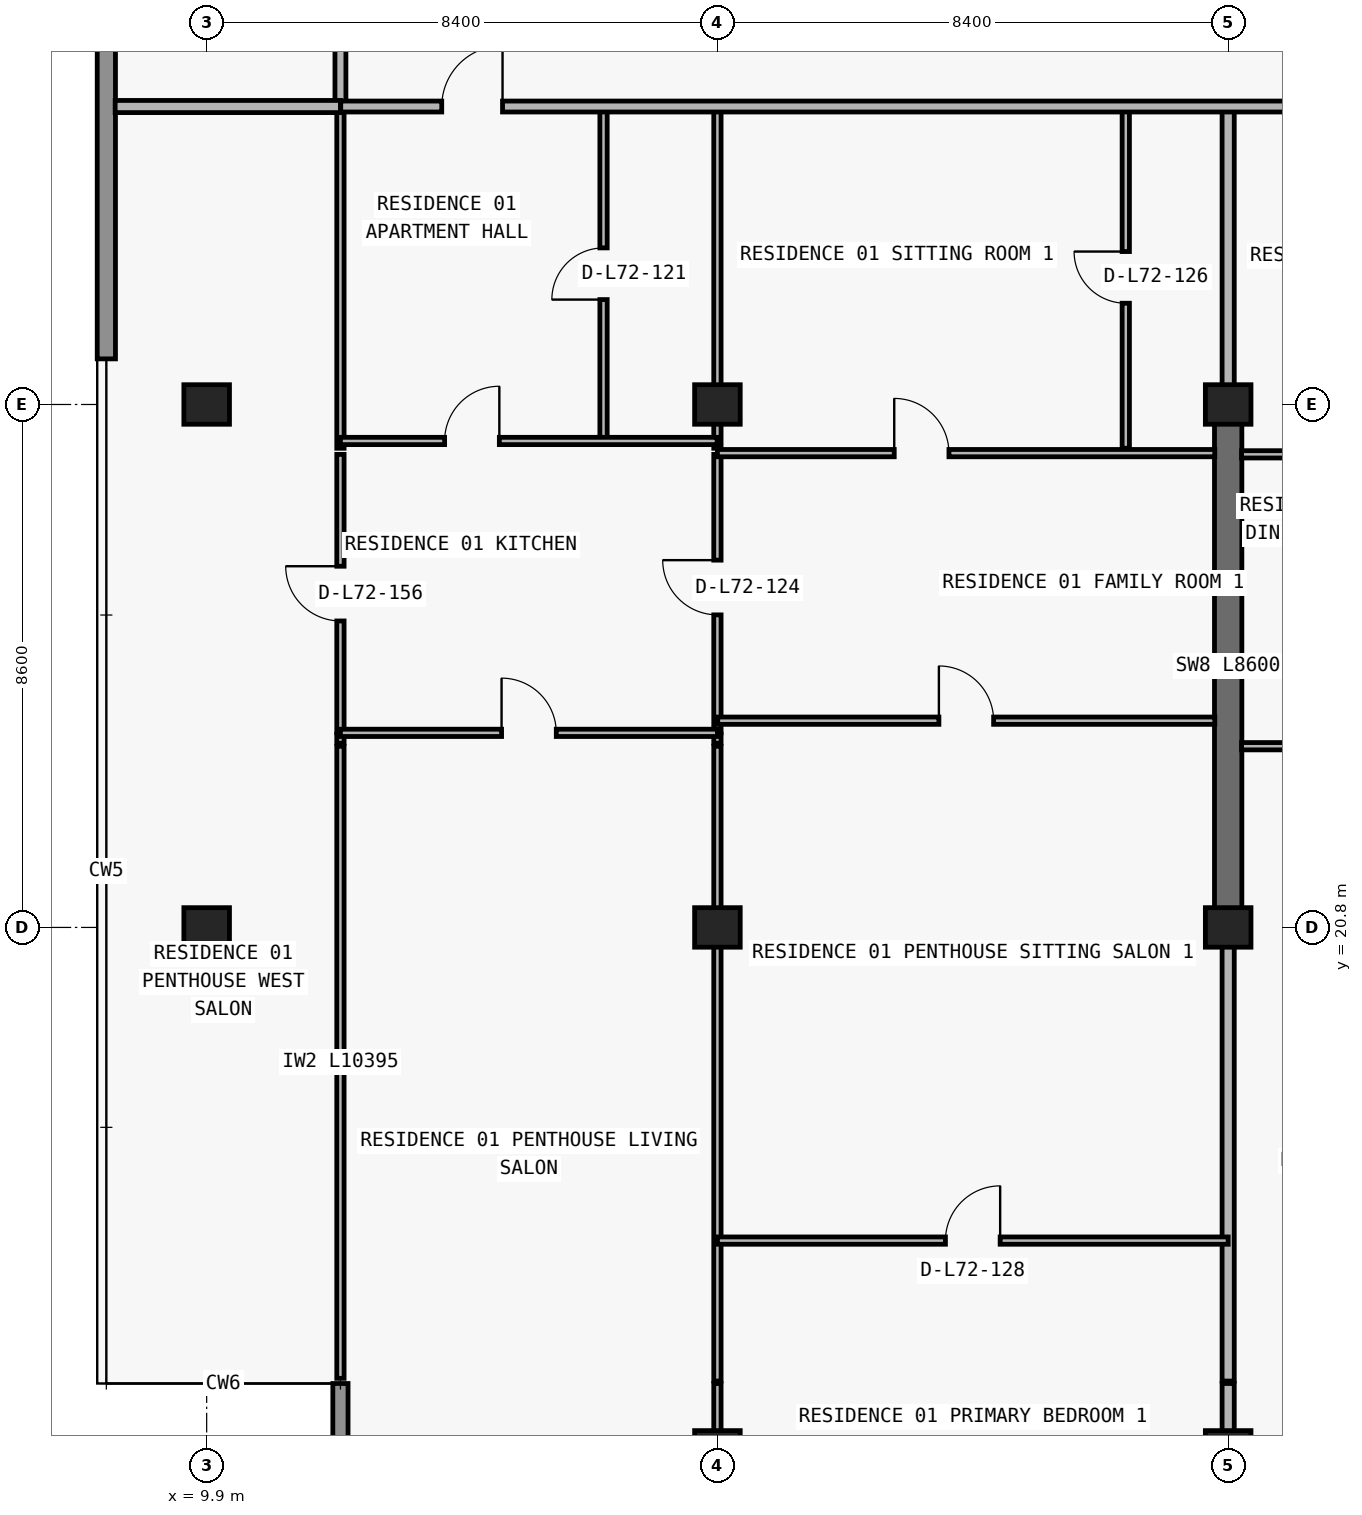
"""IFC4 building model, lengths in metres.
Left out: names, types, materials, properties, quantities, classifications, styles, units other than length and angle.
Written with IfcOpenShell. Run it as: python <this file> out.ifc"""

import sys

from ifc_helpers import new_model, si_unit, direction, frame, frame_2d, origin, origin_2d, place, context, subcontext, project, spatial, rectangle, extrude, element, fill, save


model = new_model("IFC4")
c1 = context("Model", 3, precision=1e-05, world=origin(), true_north=direction((0.0, 1.0)))
c2 = subcontext(c1, "Body", "Model", "MODEL_VIEW")
j1 = project(units=[si_unit("LENGTHUNIT", "METRE"), si_unit("PLANEANGLEUNIT", "RADIAN")], contexts=[c1])
p1 = place(None, origin())
s1 = spatial("IfcSite", under=j1, at=p1, CompositionType="ELEMENT")
p2 = place(p1, origin())
s2 = spatial("IfcBuilding", under=s1, at=p2, CompositionType="ELEMENT")
p3 = place(p2, frame((0.0, 0.0, 256.2)))
s3 = spatial("IfcBuildingStorey", under=s2, at=p3, CompositionType="ELEMENT", Elevation=256.2)
for number, where, z_axis, x_axis in (
    (1, (18.3, 12.2, 0.0), (0.0, 0.0, 1.0), (1.0, 0.0, 0.0)),
    (2, (26.7, 12.2, 0.0), (0.0, 0.0, 1.0), (1.0, 0.0, 0.0)),
    (3, (9.9, 20.8, 0.0), (0.0, 0.0, 1.0), (1.0, 0.0, 0.0)),
    (4, (18.3, 20.8, 0.0), (0.0, 0.0, 1.0), (1.0, 0.0, 0.0)),
    (5, (26.7, 20.8, 0.0), (0.0, 0.0, 1.0), (1.0, 0.0, 0.0)),
    (6, (9.9, 29.4, 0.0), (0.0, 0.0, 1.0), (1.0, 0.0, 0.0)),
    (7, (18.3, 29.4, 0.0), (0.0, 0.0, 1.0), (1.0, 0.0, 0.0)),
    (8, (26.7, 29.4, 0.0), (0.0, 0.0, 1.0), (1.0, 0.0, 0.0)),
):
    element("IfcColumn", number, at=place(p3, frame(where, z_axis=z_axis, x_axis=x_axis)), inside=s3, PredefinedType="COLUMN", context=c2, shape_type="SweptSolid", body=[
        extrude(rectangle(XDim=0.75, YDim=0.65, at=origin_2d()), origin(), (0.0, 0.0, 1.0), 3.05),
    ])
p4 = place(p3, frame((26.7, 20.8, 0.0), z_axis=(0.0, 0.0, 1.0), x_axis=(0.0, 1.0, 0.0)))
e9 = element("IfcWall", 9, at=p4, inside=s3, PredefinedType="SHEAR", context=c2, shape_type="SweptSolid", body=[
    extrude(rectangle(XDim=8.6, YDim=0.45, at=frame_2d((4.3, 0.0))), origin(), (0.0, 0.0, 1.0), 3.05),
])
p5 = place(p3, frame((12.1, 13.3, 0.0), z_axis=(0.0, 0.0, 1.0), x_axis=(0.0, -1.0, 0.0)))
e10 = element("IfcWall", 10, at=p5, inside=s3, PredefinedType="ELEMENTEDWALL", context=c2, shape_type="SweptSolid", body=[
    extrude(rectangle(XDim=3.45, YDim=0.25, at=frame_2d((1.725, 0.0))), origin(), (0.0, 0.0, 1.0), 3.05),
])
p6 = place(p3, frame((8.25, 30.15, 0.0), z_axis=(0.0, 0.0, 1.0), x_axis=(0.0, 1.0, 0.0)))
e11 = element("IfcWall", 11, at=p6, inside=s3, PredefinedType="STANDARD", context=c2, shape_type="SweptSolid", body=[
    extrude(rectangle(XDim=16.85, YDim=0.3, at=frame_2d((8.425, 0.0))), origin(), (0.0, 0.0, 1.0), 3.05),
])
p7 = place(p3, frame((12.1, 13.385, 0.0), z_axis=(0.0, 0.0, 1.0), x_axis=(0.0, 1.0, 0.0)))
e12 = element("IfcWall", 12, at=p7, inside=s3, PredefinedType="PARTITIONING", context=c2, shape_type="SweptSolid", body=[
    extrude(rectangle(XDim=10.395, YDim=0.12, at=frame_2d((5.198, 0.0))), origin(), (0.0, 0.0, 1.0), 3.05),
])
p8 = place(p3, frame((12.1, 23.83, 0.0), z_axis=(0.0, 0.0, 1.0), x_axis=(0.0, 1.0, 0.0)))
e13 = element("IfcWall", 13, at=p8, inside=s3, PredefinedType="PARTITIONING", context=c2, shape_type="SweptSolid", body=[
    extrude(rectangle(XDim=0.15, YDim=0.12, at=frame_2d((0.075, 0.0))), origin(), (0.0, 0.0, 1.0), 3.05),
])
p9 = place(p3, frame((12.1, 24.0, 0.0), z_axis=(0.0, 0.0, 1.0), x_axis=(0.0, 1.0, 0.0)))
e14 = element("IfcWall", 14, at=p9, inside=s3, PredefinedType="PARTITIONING", context=c2, shape_type="SweptSolid", body=[
    extrude(rectangle(XDim=4.58, YDim=0.12, at=frame_2d((2.29, 0.0))), origin(), (0.0, 0.0, 1.0), 3.05),
])
p10 = place(p9, frame((1.84, 0.0, 0.0)))
e15 = element("IfcOpeningElement", 15, at=p10, cuts=e14, PredefinedType="OPENING", context=c2, shape_type="SweptSolid", body=[
    extrude(rectangle(XDim=0.9, YDim=2.15, at=frame_2d((0.45, 1.075))), frame((0.0, 0.07, 0.0), z_axis=(0.0, -1.0, 0.0), x_axis=(1.0, 0.0, 0.0)), (0.0, 0.0, 1.0), 0.14),
])
p11 = place(p3, frame((12.1, 28.68, 0.0), z_axis=(0.0, 0.0, 1.0), x_axis=(0.0, 1.0, 0.0)))
e16 = element("IfcWall", 16, at=p11, inside=s3, PredefinedType="PARTITIONING", context=c2, shape_type="SweptSolid", body=[
    extrude(rectangle(XDim=5.62, YDim=0.12, at=frame_2d((2.81, 0.0))), origin(), (0.0, 0.0, 1.0), 3.05),
])
p12 = place(p3, frame((12.1, 34.305, 0.0), z_axis=(0.0, 0.0, 1.0), x_axis=(0.0, 1.0, 0.0)))
e17 = element("IfcWall", 17, at=p12, inside=s3, PredefinedType="PARTITIONING", context=c2, shape_type="SweptSolid", body=[
    extrude(rectangle(XDim=2.695, YDim=0.18, at=frame_2d((1.348, 0.0))), origin(), (0.0, 0.0, 1.0), 3.05),
])
p13 = place(p3, frame((16.427, 28.8, 0.0), z_axis=(0.0, 0.0, 1.0), x_axis=(0.0, 1.0, 0.0)))
e18 = element("IfcWall", 18, at=p13, inside=s3, PredefinedType="PARTITIONING", context=c2, shape_type="SweptSolid", body=[
    extrude(rectangle(XDim=5.5, YDim=0.12, at=frame_2d((2.75, 0.0))), origin(), (0.0, 0.0, 1.0), 3.05),
])
p14 = place(p13, frame((2.325, 0.0, 0.0)))
e19 = element("IfcOpeningElement", 19, at=p14, cuts=e18, PredefinedType="OPENING", context=c2, shape_type="SweptSolid", body=[
    extrude(rectangle(XDim=0.85, YDim=2.1, at=frame_2d((0.425, 1.05))), frame((0.0, 0.07, 0.0), z_axis=(0.0, -1.0, 0.0), x_axis=(1.0, 0.0, 0.0)), (0.0, 0.0, 1.0), 0.14),
])
p15 = place(p3, frame((18.3, 9.995, 0.0), z_axis=(0.0, 0.0, 1.0), x_axis=(0.0, 1.0, 0.0)))
e20 = element("IfcWall", 20, at=p15, inside=s3, PredefinedType="PARTITIONING", context=c2, shape_type="SweptSolid", body=[
    extrude(rectangle(XDim=3.305, YDim=0.12, at=frame_2d((1.652, 0.0))), origin(), (0.0, 0.0, 1.0), 2.263),
])
p16 = place(p3, frame((18.3, 13.34, 0.0), z_axis=(0.0, 0.0, 1.0), x_axis=(0.0, 1.0, 0.0)))
e21 = element("IfcWall", 21, at=p16, inside=s3, PredefinedType="PARTITIONING", context=c2, shape_type="SweptSolid", body=[
    extrude(rectangle(XDim=10.44, YDim=0.12, at=frame_2d((5.22, 0.0))), origin(), (0.0, 0.0, 1.0), 2.263),
])
p17 = place(p3, frame((18.3, 23.83, 0.0), z_axis=(0.0, 0.0, 1.0), x_axis=(0.0, 1.0, 0.0)))
e22 = element("IfcWall", 22, at=p17, inside=s3, PredefinedType="PARTITIONING", context=c2, shape_type="SweptSolid", body=[
    extrude(rectangle(XDim=0.15, YDim=0.12, at=frame_2d((0.075, 0.0))), origin(), (0.0, 0.0, 1.0), 2.263),
])
p18 = place(p3, frame((18.3, 24.0, 0.0), z_axis=(0.0, 0.0, 1.0), x_axis=(0.0, 1.0, 0.0)))
e23 = element("IfcWall", 23, at=p18, inside=s3, PredefinedType="PARTITIONING", context=c2, shape_type="SweptSolid", body=[
    extrude(rectangle(XDim=4.58, YDim=0.12, at=frame_2d((2.29, 0.0))), origin(), (0.0, 0.0, 1.0), 2.263),
])
p19 = place(p18, frame((1.94, 0.0, 0.0)))
e24 = element("IfcOpeningElement", 24, at=p19, cuts=e23, PredefinedType="OPENING", context=c2, shape_type="SweptSolid", body=[
    extrude(rectangle(XDim=0.9, YDim=2.15, at=frame_2d((0.45, 1.075))), frame((0.0, 0.07, 0.0), z_axis=(0.0, -1.0, 0.0), x_axis=(1.0, 0.0, 0.0)), (0.0, 0.0, 1.0), 0.14),
])
p20 = place(p3, frame((18.3, 28.68, 0.0), z_axis=(0.0, 0.0, 1.0), x_axis=(0.0, 1.0, 0.0)))
e25 = element("IfcWall", 25, at=p20, inside=s3, PredefinedType="PARTITIONING", context=c2, shape_type="SweptSolid", body=[
    extrude(rectangle(XDim=5.62, YDim=0.12, at=frame_2d((2.81, 0.0))), origin(), (0.0, 0.0, 1.0), 2.263),
])
p21 = place(p3, frame((25.016, 28.68, 0.0), z_axis=(0.0, 0.0, 1.0), x_axis=(0.0, 1.0, 0.0)))
e26 = element("IfcWall", 26, at=p21, inside=s3, PredefinedType="PARTITIONING", context=c2, shape_type="SweptSolid", body=[
    extrude(rectangle(XDim=5.62, YDim=0.12, at=frame_2d((2.81, 0.0))), origin(), (0.0, 0.0, 1.0), 3.05),
])
p22 = place(p21, frame((2.385, 0.0, 0.0)))
e27 = element("IfcOpeningElement", 27, at=p22, cuts=e26, PredefinedType="OPENING", context=c2, shape_type="SweptSolid", body=[
    extrude(rectangle(XDim=0.85, YDim=2.1, at=frame_2d((0.425, 1.05))), frame((0.0, 0.07, 0.0), z_axis=(0.0, -1.0, 0.0), x_axis=(1.0, 0.0, 0.0)), (0.0, 0.0, 1.0), 0.14),
])
p23 = place(p3, frame((26.7, 9.995, 0.0), z_axis=(0.0, 0.0, 1.0), x_axis=(0.0, 1.0, 0.0)))
e28 = element("IfcWall", 28, at=p23, inside=s3, PredefinedType="PARTITIONING", context=c2, shape_type="SweptSolid", body=[
    extrude(rectangle(XDim=3.305, YDim=0.2, at=frame_2d((1.652, 0.0))), origin(), (0.0, 0.0, 1.0), 2.263),
])
p24 = place(p3, frame((26.7, 13.34, 0.0), z_axis=(0.0, 0.0, 1.0), x_axis=(0.0, 1.0, 0.0)))
e29 = element("IfcWall", 29, at=p24, inside=s3, PredefinedType="PARTITIONING", context=c2, shape_type="SweptSolid", body=[
    extrude(rectangle(XDim=7.455, YDim=0.2, at=frame_2d((3.728, 0.0))), origin(), (0.0, 0.0, 1.0), 2.263),
])
p25 = place(p3, frame((26.7, 29.405, 0.0), z_axis=(0.0, 0.0, 1.0), x_axis=(0.0, 1.0, 0.0)))
e30 = element("IfcWall", 30, at=p25, inside=s3, PredefinedType="PARTITIONING", context=c2, shape_type="SweptSolid", body=[
    extrude(rectangle(XDim=4.895, YDim=0.2, at=frame_2d((2.448, 0.0))), origin(), (0.0, 0.0, 1.0), 2.335),
])
p26 = place(p3, frame((18.3, 15.65, 0.0), z_axis=(0.0, 0.0, 1.0), x_axis=(1.0, 0.0, 0.0)))
e31 = element("IfcWall", 31, at=p26, inside=s3, PredefinedType="PARTITIONING", context=c2, shape_type="SweptSolid", body=[
    extrude(rectangle(XDim=8.4, YDim=0.12, at=frame_2d((4.2, 0.0))), origin(), (0.0, 0.0, 1.0), 3.05),
])
p27 = place(p26, frame((3.75, 0.0, 0.0)))
e32 = element("IfcOpeningElement", 32, at=p27, cuts=e31, PredefinedType="OPENING", context=c2, shape_type="SweptSolid", body=[
    extrude(rectangle(XDim=0.9, YDim=2.15, at=frame_2d((0.45, 1.075))), frame((0.0, 0.07, 0.0), z_axis=(0.0, -1.0, 0.0), x_axis=(1.0, 0.0, 0.0)), (0.0, 0.0, 1.0), 0.14),
])
p28 = place(p3, frame((26.92, 23.78, 0.0), z_axis=(0.0, 0.0, 1.0), x_axis=(1.0, 0.0, 0.0)))
e33 = element("IfcWall", 33, at=p28, inside=s3, PredefinedType="PARTITIONING", context=c2, shape_type="SweptSolid", body=[
    extrude(rectangle(XDim=8.18, YDim=0.12, at=frame_2d((4.09, 0.0))), origin(), (0.0, 0.0, 1.0), 3.05),
])
p29 = place(p28, frame((1.204, 0.0, 0.0)))
e34 = element("IfcOpeningElement", 34, at=p29, cuts=e33, PredefinedType="OPENING", context=c2, shape_type="SweptSolid", body=[
    extrude(rectangle(XDim=0.9, YDim=2.15, at=frame_2d((0.45, 1.075))), frame((0.0, 0.07, 0.0), z_axis=(0.0, -1.0, 0.0), x_axis=(1.0, 0.0, 0.0)), (0.0, 0.0, 1.0), 0.14),
])
p30 = place(p3, frame((12.1, 24.0, 0.0), z_axis=(0.0, 0.0, 1.0), x_axis=(1.0, 0.0, 0.0)))
e35 = element("IfcWall", 35, at=p30, inside=s3, PredefinedType="PARTITIONING", context=c2, shape_type="SweptSolid", body=[
    extrude(rectangle(XDim=6.2, YDim=0.12, at=frame_2d((3.1, 0.0))), origin(), (0.0, 0.0, 1.0), 3.05),
])
p31 = place(p30, frame((2.65, 0.0, 0.0)))
e36 = element("IfcOpeningElement", 36, at=p31, cuts=e35, PredefinedType="OPENING", context=c2, shape_type="SweptSolid", body=[
    extrude(rectangle(XDim=0.9, YDim=2.15, at=frame_2d((0.45, 1.075))), frame((0.0, 0.07, 0.0), z_axis=(0.0, -1.0, 0.0), x_axis=(1.0, 0.0, 0.0)), (0.0, 0.0, 1.0), 0.14),
])
p32 = place(p3, frame((18.305, 24.2, 0.0), z_axis=(0.0, 0.0, 1.0), x_axis=(1.0, 0.0, 0.0)))
e37 = element("IfcWall", 37, at=p32, inside=s3, PredefinedType="PARTITIONING", context=c2, shape_type="SweptSolid", body=[
    extrude(rectangle(XDim=8.175, YDim=0.12, at=frame_2d((4.087, 0.0))), origin(), (0.0, 0.0, 1.0), 3.05),
])
p33 = place(p32, frame((3.637, 0.0, 0.0)))
e38 = element("IfcOpeningElement", 38, at=p33, cuts=e37, PredefinedType="OPENING", context=c2, shape_type="SweptSolid", body=[
    extrude(rectangle(XDim=0.9, YDim=2.15, at=frame_2d((0.45, 1.075))), frame((0.0, 0.07, 0.0), z_axis=(0.0, -1.0, 0.0), x_axis=(1.0, 0.0, 0.0)), (0.0, 0.0, 1.0), 0.14),
])
p34 = place(p3, frame((26.92, 28.58, 0.0), z_axis=(0.0, 0.0, 1.0), x_axis=(1.0, 0.0, 0.0)))
e39 = element("IfcWall", 39, at=p34, inside=s3, PredefinedType="PARTITIONING", context=c2, shape_type="SweptSolid", body=[
    extrude(rectangle(XDim=8.175, YDim=0.12, at=frame_2d((4.087, 0.0))), origin(), (0.0, 0.0, 1.0), 3.05),
])
p35 = place(p34, frame((1.204, 0.0, 0.0)))
e40 = element("IfcOpeningElement", 40, at=p35, cuts=e39, PredefinedType="OPENING", context=c2, shape_type="SweptSolid", body=[
    extrude(rectangle(XDim=0.9, YDim=2.15, at=frame_2d((0.45, 1.075))), frame((0.0, 0.07, 0.0), z_axis=(0.0, -1.0, 0.0), x_axis=(1.0, 0.0, 0.0)), (0.0, 0.0, 1.0), 0.14),
])
p36 = place(p3, frame((18.3, 28.6, 0.0), z_axis=(0.0, 0.0, 1.0), x_axis=(1.0, 0.0, 0.0)))
e41 = element("IfcWall", 41, at=p36, inside=s3, PredefinedType="PARTITIONING", context=c2, shape_type="SweptSolid", body=[
    extrude(rectangle(XDim=8.18, YDim=0.12, at=frame_2d((4.09, 0.0))), origin(), (0.0, 0.0, 1.0), 3.05),
])
p37 = place(p36, frame((2.908, 0.0, 0.0)))
e42 = element("IfcOpeningElement", 42, at=p37, cuts=e41, PredefinedType="OPENING", context=c2, shape_type="SweptSolid", body=[
    extrude(rectangle(XDim=0.9, YDim=2.15, at=frame_2d((0.45, 1.075))), frame((0.0, 0.07, 0.0), z_axis=(0.0, -1.0, 0.0), x_axis=(1.0, 0.0, 0.0)), (0.0, 0.0, 1.0), 0.14),
])
p38 = place(p3, frame((12.1, 28.8, 0.0), z_axis=(0.0, 0.0, 1.0), x_axis=(1.0, 0.0, 0.0)))
e43 = element("IfcWall", 43, at=p38, inside=s3, PredefinedType="PARTITIONING", context=c2, shape_type="SweptSolid", body=[
    extrude(rectangle(XDim=6.195, YDim=0.12, at=frame_2d((3.097, 0.0))), origin(), (0.0, 0.0, 1.0), 3.05),
])
p39 = place(p38, frame((1.713, 0.0, 0.0)))
e44 = element("IfcOpeningElement", 44, at=p39, cuts=e43, PredefinedType="OPENING", context=c2, shape_type="SweptSolid", body=[
    extrude(rectangle(XDim=0.9, YDim=2.15, at=frame_2d((0.45, 1.075))), frame((0.0, 0.07, 0.0), z_axis=(0.0, -1.0, 0.0), x_axis=(1.0, 0.0, 0.0)), (0.0, 0.0, 1.0), 0.14),
])
p40 = place(p3, frame((8.395, 34.3, 0.0), z_axis=(0.0, 0.0, 1.0), x_axis=(1.0, 0.0, 0.0)))
e45 = element("IfcWall", 45, at=p40, inside=s3, PredefinedType="PARTITIONING", context=c2, shape_type="SweptSolid", body=[
    extrude(rectangle(XDim=3.705, YDim=0.2, at=frame_2d((1.853, 0.0))), origin(), (0.0, 0.0, 1.0), 3.05),
])
p41 = place(p3, frame((12.105, 34.3, 0.0), z_axis=(0.0, 0.0, 1.0), x_axis=(1.0, 0.0, 0.0)))
e46 = element("IfcWall", 46, at=p41, inside=s3, PredefinedType="PARTITIONING", context=c2, shape_type="SweptSolid", body=[
    extrude(rectangle(XDim=53.595, YDim=0.18, at=frame_2d((26.797, 0.0))), origin(), (0.0, 0.0, 1.0), 3.05),
])
p42 = place(p41, frame((1.661, 0.0, 0.0)))
e47 = element("IfcOpeningElement", 47, at=p42, cuts=e46, PredefinedType="OPENING", context=c2, shape_type="SweptSolid", body=[
    extrude(rectangle(XDim=1.0, YDim=2.2, at=frame_2d((0.5, 1.1))), frame((0.0, 0.1, 0.0), z_axis=(0.0, -1.0, 0.0), x_axis=(1.0, 0.0, 0.0)), (0.0, 0.0, 1.0), 0.2),
])
p43 = place(p41, frame((17.438, 0.0, 0.0)))
e48 = element("IfcOpeningElement", 48, at=p43, cuts=e46, PredefinedType="OPENING", context=c2, shape_type="SweptSolid", body=[
    extrude(rectangle(XDim=1.0, YDim=2.2, at=frame_2d((0.5, 1.1))), frame((0.0, 0.1, 0.0), z_axis=(0.0, -1.0, 0.0), x_axis=(1.0, 0.0, 0.0)), (0.0, 0.0, 1.0), 0.2),
])
p44 = place(p41, frame((41.727, 0.0, 0.0)))
e49 = element("IfcOpeningElement", 49, at=p44, cuts=e46, PredefinedType="OPENING", context=c2, shape_type="SweptSolid", body=[
    extrude(rectangle(XDim=1.0, YDim=2.2, at=frame_2d((0.5, 1.1))), frame((0.0, 0.1, 0.0), z_axis=(0.0, -1.0, 0.0), x_axis=(1.0, 0.0, 0.0)), (0.0, 0.0, 1.0), 0.2),
])
p45 = place(p41, frame((49.141, 0.0, 0.0)))
e50 = element("IfcOpeningElement", 50, at=p45, cuts=e46, PredefinedType="OPENING", context=c2, shape_type="SweptSolid", body=[
    extrude(rectangle(XDim=1.0, YDim=2.2, at=frame_2d((0.5, 1.1))), frame((0.0, 0.1, 0.0), z_axis=(0.0, -1.0, 0.0), x_axis=(1.0, 0.0, 0.0)), (0.0, 0.0, 1.0), 0.2),
])
p46 = place(p42, origin())
e51 = element("IfcDoor", 51, at=p46, inside=s3, OperationType="SINGLE_SWING_RIGHT", PredefinedType="DOOR", context=c2, shape_type="SweptSolid", body=[
    extrude(rectangle(XDim=1.0, YDim=2.2, at=frame_2d((0.5, 1.1))), frame((0.0, 0.025, 0.0), z_axis=(0.0, -1.0, 0.0), x_axis=(1.0, 0.0, 0.0)), (0.0, 0.0, 1.0), 0.05),
])
fill(e47, e51)
p47 = place(p14, origin())
e52 = element("IfcDoor", 52, at=p47, inside=s3, OperationType="SINGLE_SWING_LEFT", PredefinedType="DOOR", context=c2, shape_type="SweptSolid", body=[
    extrude(rectangle(XDim=0.85, YDim=2.1, at=frame_2d((0.425, 1.05))), frame((0.0, 0.025, 0.0), z_axis=(0.0, -1.0, 0.0), x_axis=(1.0, 0.0, 0.0)), (0.0, 0.0, 1.0), 0.05),
])
fill(e19, e52)
p48 = place(p39, origin())
e53 = element("IfcDoor", 53, at=p48, inside=s3, OperationType="SINGLE_SWING_RIGHT", PredefinedType="DOOR", context=c2, shape_type="SweptSolid", body=[
    extrude(rectangle(XDim=0.9, YDim=2.15, at=frame_2d((0.45, 1.075))), frame((0.0, 0.025, 0.0), z_axis=(0.0, -1.0, 0.0), x_axis=(1.0, 0.0, 0.0)), (0.0, 0.0, 1.0), 0.05),
])
fill(e44, e53)
p49 = place(p31, origin())
e54 = element("IfcDoor", 54, at=p49, inside=s3, OperationType="SINGLE_SWING_LEFT", PredefinedType="DOOR", context=c2, shape_type="SweptSolid", body=[
    extrude(rectangle(XDim=0.9, YDim=2.15, at=frame_2d((0.45, 1.075))), frame((0.0, 0.025, 0.0), z_axis=(0.0, -1.0, 0.0), x_axis=(1.0, 0.0, 0.0)), (0.0, 0.0, 1.0), 0.05),
])
fill(e36, e54)
p50 = place(p19, origin())
e55 = element("IfcDoor", 55, at=p50, inside=s3, OperationType="SINGLE_SWING_RIGHT", PredefinedType="DOOR", context=c2, shape_type="SweptSolid", body=[
    extrude(rectangle(XDim=0.9, YDim=2.15, at=frame_2d((0.45, 1.075))), frame((0.0, 0.025, 0.0), z_axis=(0.0, -1.0, 0.0), x_axis=(1.0, 0.0, 0.0)), (0.0, 0.0, 1.0), 0.05),
])
fill(e24, e55)
p51 = place(p37, origin())
e56 = element("IfcDoor", 56, at=p51, inside=s3, OperationType="SINGLE_SWING_LEFT", PredefinedType="DOOR", context=c2, shape_type="SweptSolid", body=[
    extrude(rectangle(XDim=0.9, YDim=2.15, at=frame_2d((0.45, 1.075))), frame((0.0, 0.025, 0.0), z_axis=(0.0, -1.0, 0.0), x_axis=(1.0, 0.0, 0.0)), (0.0, 0.0, 1.0), 0.05),
])
fill(e42, e56)
p52 = place(p22, origin())
e57 = element("IfcDoor", 57, at=p52, inside=s3, OperationType="SINGLE_SWING_RIGHT", PredefinedType="DOOR", context=c2, shape_type="SweptSolid", body=[
    extrude(rectangle(XDim=0.85, YDim=2.1, at=frame_2d((0.425, 1.05))), frame((0.0, 0.025, 0.0), z_axis=(0.0, -1.0, 0.0), x_axis=(1.0, 0.0, 0.0)), (0.0, 0.0, 1.0), 0.05),
])
fill(e27, e57)
p53 = place(p33, origin())
e58 = element("IfcDoor", 58, at=p53, inside=s3, OperationType="SINGLE_SWING_LEFT", PredefinedType="DOOR", context=c2, shape_type="SweptSolid", body=[
    extrude(rectangle(XDim=0.9, YDim=2.15, at=frame_2d((0.45, 1.075))), frame((0.0, 0.025, 0.0), z_axis=(0.0, -1.0, 0.0), x_axis=(1.0, 0.0, 0.0)), (0.0, 0.0, 1.0), 0.05),
])
fill(e38, e58)
p54 = place(p27, origin())
e59 = element("IfcDoor", 59, at=p54, inside=s3, OperationType="SINGLE_SWING_RIGHT", PredefinedType="DOOR", context=c2, shape_type="SweptSolid", body=[
    extrude(rectangle(XDim=0.9, YDim=2.15, at=frame_2d((0.45, 1.075))), frame((0.0, 0.025, 0.0), z_axis=(0.0, -1.0, 0.0), x_axis=(1.0, 0.0, 0.0)), (0.0, 0.0, 1.0), 0.05),
])
fill(e32, e59)
p55 = place(p10, origin())
e60 = element("IfcDoor", 60, at=p55, inside=s3, OperationType="SINGLE_SWING_RIGHT", PredefinedType="DOOR", context=c2, shape_type="SweptSolid", body=[
    extrude(rectangle(XDim=0.9, YDim=2.15, at=frame_2d((0.45, 1.075))), frame((0.0, 0.025, 0.0), z_axis=(0.0, -1.0, 0.0), x_axis=(1.0, 0.0, 0.0)), (0.0, 0.0, 1.0), 0.05),
])
fill(e15, e60)
save(model, sys.argv[1])
